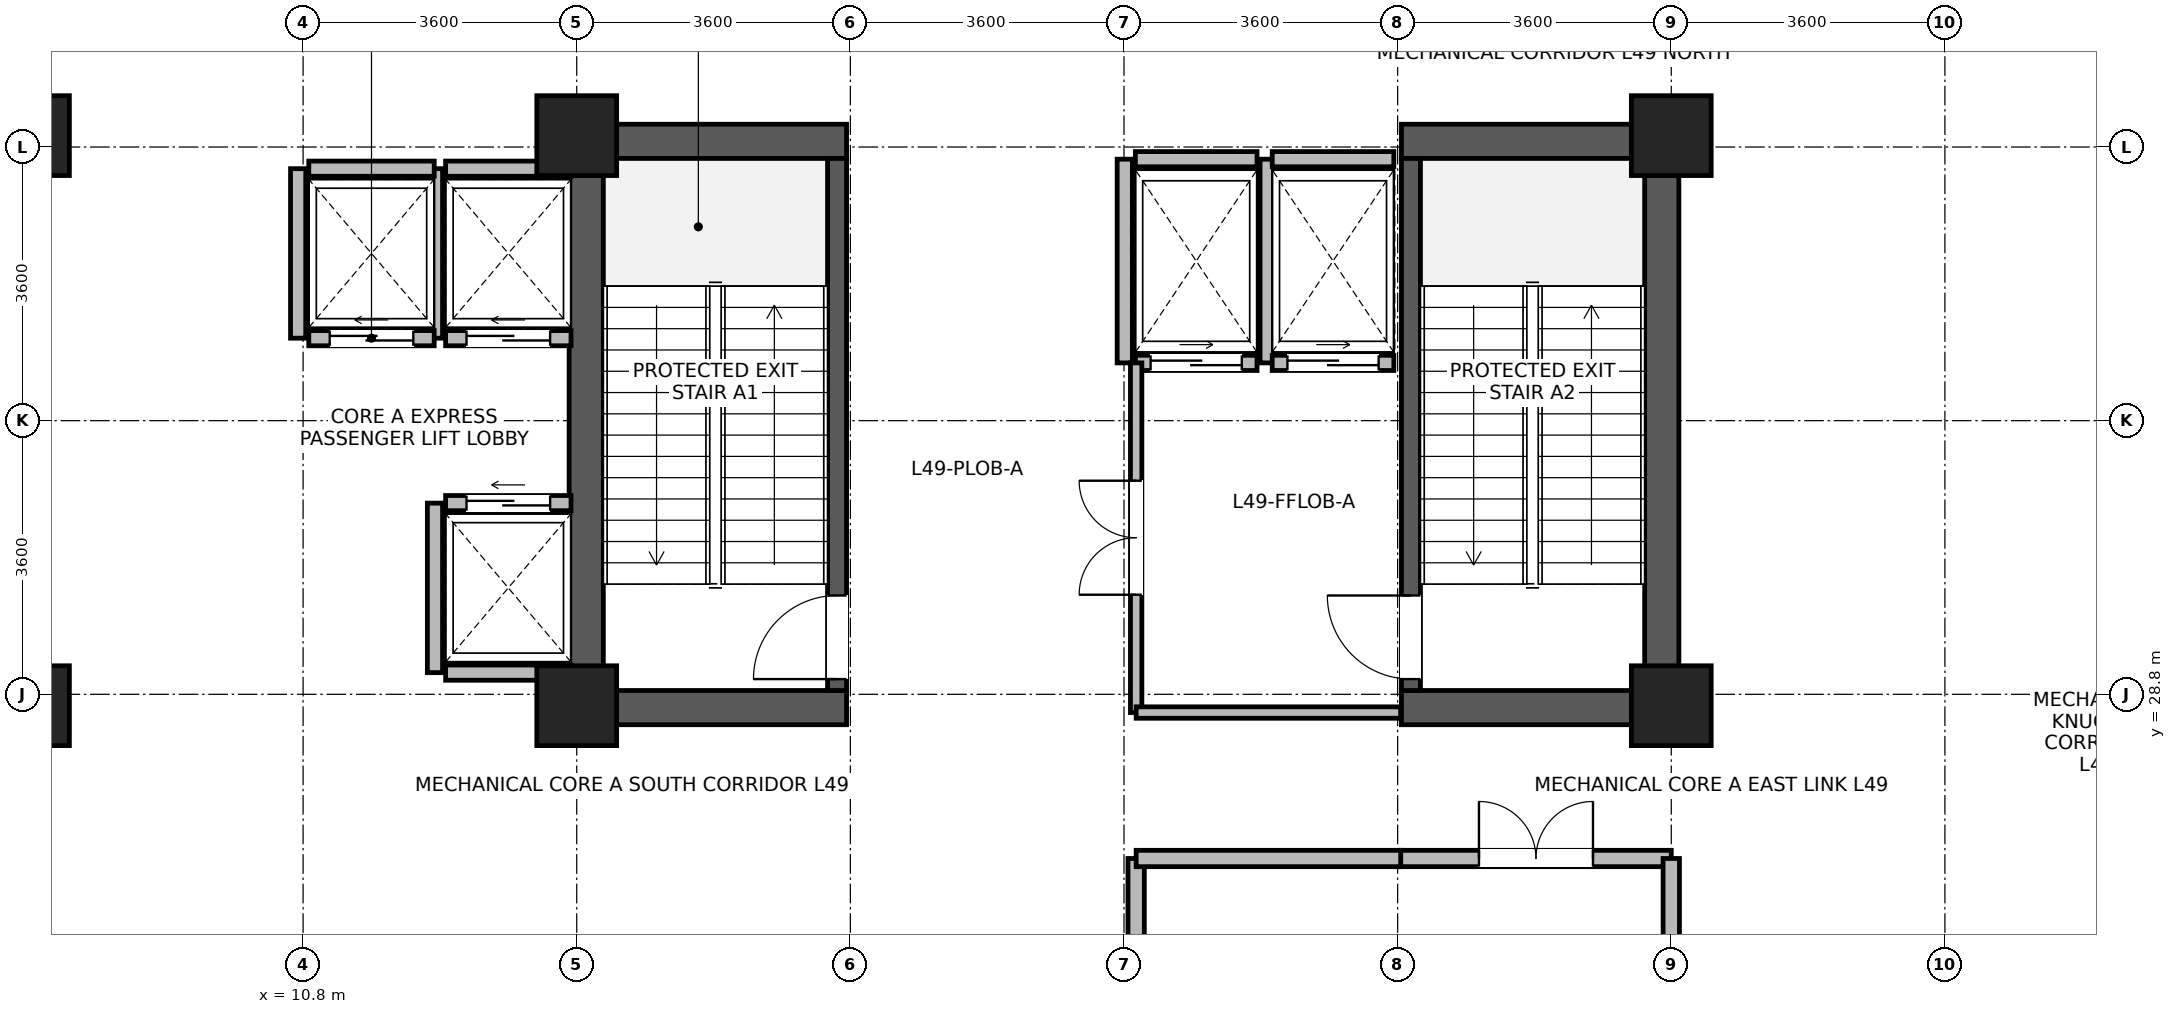
"""IFC4 building model, lengths in metres.
Left out: names, types, materials, properties, quantities, classifications, styles, units other than length and angle.
Written with IfcOpenShell. Run it as: python <this file> out.ifc"""

import sys

from ifc_helpers import new_model, si_unit, direction, frame, frame_2d, origin, origin_2d, place, context, subcontext, project, spatial, rectangle, extrude, source, transform, mapped, element, fill, save


model = new_model("IFC4")
c1 = context("Model", 3, precision=1e-05, world=origin(), true_north=direction((0.0, 1.0)))
c2 = subcontext(c1, "Body", "Model", "MODEL_VIEW")
j1 = project(units=[si_unit("LENGTHUNIT", "METRE"), si_unit("PLANEANGLEUNIT", "RADIAN")], contexts=[c1])
p1 = place(None, origin())
s1 = spatial("IfcSite", under=j1, at=p1, CompositionType="ELEMENT")
p2 = place(p1, origin())
s2 = spatial("IfcBuilding", under=s1, at=p2, CompositionType="ELEMENT")
p3 = place(p2, frame((0.0, 0.0, 192.0)))
s3 = spatial("IfcBuildingStorey", under=s2, at=p3, CompositionType="ELEMENT", Elevation=192.0)
for number, where, z_axis, x_axis in (
    (1, (14.525, 28.4, 0.0), (0.0, 0.0, 1.0), (0.0, 1.0, 0.0)),
    (2, (28.675, 28.4, 0.0), (0.0, 0.0, 1.0), (0.0, 1.0, 0.0)),
):
    element("IfcWall", number, at=place(p3, frame(where, z_axis=z_axis, x_axis=x_axis)), inside=s3, PredefinedType="SHEAR", context=c2, shape_type="SweptSolid", body=[
        extrude(rectangle(XDim=7.9, YDim=0.45, at=frame_2d((3.95, 0.0))), origin(), (0.0, 0.0, 1.0), 4.78),
    ])
for number, where, z_axis, x_axis in (
    (3, (14.75, 28.625, 0.0), (0.0, 0.0, 1.0), (1.0, 0.0, 0.0)),
    (4, (25.25, 28.625, 0.0), (0.0, 0.0, 1.0), (1.0, 0.0, 0.0)),
    (5, (14.75, 36.075, 0.0), (0.0, 0.0, 1.0), (1.0, 0.0, 0.0)),
    (6, (25.25, 36.075, 0.0), (0.0, 0.0, 1.0), (1.0, 0.0, 0.0)),
):
    element("IfcWall", number, at=place(p3, frame(where, z_axis=z_axis, x_axis=x_axis)), inside=s3, PredefinedType="SHEAR", context=c2, shape_type="SweptSolid", body=[
        extrude(rectangle(XDim=3.2, YDim=0.45, at=frame_2d((1.6, 0.0))), origin(), (0.0, 0.0, 1.0), 4.78),
    ])
p4 = place(p3, frame((17.825, 28.85, 0.0), z_axis=(0.0, 0.0, 1.0), x_axis=(0.0, 1.0, 0.0)))
e7 = element("IfcWall", 7, at=p4, inside=s3, PredefinedType="SHEAR", context=c2, shape_type="SweptSolid", body=[
    extrude(rectangle(XDim=7.0, YDim=0.25, at=frame_2d((3.5, 0.0))), origin(), (0.0, 0.0, 1.0), 4.78),
])
p5 = place(p4, frame((0.15, 0.0, 0.0)))
e8 = element("IfcOpeningElement", 8, at=p5, cuts=e7, PredefinedType="OPENING", context=c2, shape_type="SweptSolid", body=[
    extrude(rectangle(XDim=1.1, YDim=2.08, at=frame_2d((0.55, 1.04))), frame((0.0, 0.135, 0.0), z_axis=(0.0, -1.0, 0.0), x_axis=(1.0, 0.0, 0.0)), (0.0, 0.0, 1.0), 0.27),
])
p6 = place(p3, frame((25.375, 28.85, 0.0), z_axis=(0.0, 0.0, 1.0), x_axis=(0.0, 1.0, 0.0)))
e9 = element("IfcWall", 9, at=p6, inside=s3, PredefinedType="SHEAR", context=c2, shape_type="SweptSolid", body=[
    extrude(rectangle(XDim=7.0, YDim=0.25, at=frame_2d((3.5, 0.0))), origin(), (0.0, 0.0, 1.0), 4.78),
])
p7 = place(p6, frame((0.15, 0.0, 0.0)))
e10 = element("IfcOpeningElement", 10, at=p7, cuts=e9, PredefinedType="OPENING", context=c2, shape_type="SweptSolid", body=[
    extrude(rectangle(XDim=1.1, YDim=2.08, at=frame_2d((0.55, 1.04))), frame((0.0, 0.135, 0.0), z_axis=(0.0, -1.0, 0.0), x_axis=(1.0, 0.0, 0.0)), (0.0, 0.0, 1.0), 0.27),
])
m1 = source(origin(), c2, "Body", "SweptSolid", [
    extrude(rectangle(XDim=1.05, YDim=1.05, at=origin_2d()), origin(), (0.0, 0.0, 1.0), 5.2),
])
for number, where, z_axis, x_axis in (
    (11, (7.2, 28.65, 0.0), (0.0, 0.0, 1.0), (1.0, 0.0, 0.0)),
    (12, (7.2, 36.15, 0.0), (0.0, 0.0, 1.0), (1.0, 0.0, 0.0)),
    (13, (14.4, 28.65, 0.0), (0.0, 0.0, 1.0), (1.0, 0.0, 0.0)),
    (14, (14.4, 36.15, 0.0), (0.0, 0.0, 1.0), (1.0, 0.0, 0.0)),
    (15, (28.8, 28.65, 0.0), (0.0, 0.0, 1.0), (1.0, 0.0, 0.0)),
    (16, (28.8, 36.15, 0.0), (0.0, 0.0, 1.0), (1.0, 0.0, 0.0)),
):
    element("IfcColumn", number, at=place(p3, frame(where, z_axis=z_axis, x_axis=x_axis)), inside=s3, PredefinedType="COLUMN", context=c2, shape_type="MappedRepresentation", body=[
        mapped(m1, transform((0.0, 0.0, 0.0), x_axis=(1.0, 0.0, 0.0), y_axis=(0.0, 1.0, 0.0), z_axis=(0.0, 0.0, 1.0), scale=1.0)),
    ])
p8 = place(p3, frame((12.675, 33.485, 0.0), z_axis=(0.0, 0.0, 1.0), x_axis=(1.0, 0.0, 0.0)))
e17 = element("IfcWall", 17, at=p8, inside=s3, PredefinedType="PARTITIONING", context=c2, shape_type="SweptSolid", body=[
    extrude(rectangle(XDim=1.65, YDim=0.2, at=frame_2d((0.825, 0.0))), origin(), (0.0, 0.0, 1.0), 4.76),
])
p9 = place(p8, frame((0.275, 0.0, 0.0)))
e18 = element("IfcOpeningElement", 18, at=p9, cuts=e17, PredefinedType="OPENING", context=c2, shape_type="SweptSolid", body=[
    extrude(rectangle(XDim=1.1, YDim=2.12, at=frame_2d((0.55, 1.06))), frame((0.0, 0.11, 0.0), z_axis=(0.0, -1.0, 0.0), x_axis=(1.0, 0.0, 0.0)), (0.0, 0.0, 1.0), 0.22),
])
p10 = place(p3, frame((12.675, 35.715, 0.0), z_axis=(0.0, 0.0, 1.0), x_axis=(1.0, 0.0, 0.0)))
e19 = element("IfcWall", 19, at=p10, inside=s3, PredefinedType="PARTITIONING", context=c2, shape_type="SweptSolid", body=[
    extrude(rectangle(XDim=1.65, YDim=0.2, at=frame_2d((0.825, 0.0))), origin(), (0.0, 0.0, 1.0), 4.76),
])
p11 = place(p3, frame((12.535, 33.485, 0.0), z_axis=(0.0, 0.0, 1.0), x_axis=(0.0, 1.0, 0.0)))
e20 = element("IfcWall", 20, at=p11, inside=s3, PredefinedType="PARTITIONING", context=c2, shape_type="SweptSolid", body=[
    extrude(rectangle(XDim=2.23, YDim=0.2, at=frame_2d((1.115, 0.0))), origin(), (0.0, 0.0, 1.0), 4.76),
])
p12 = place(p3, frame((12.675, 29.085, 0.0), z_axis=(0.0, 0.0, 1.0), x_axis=(1.0, 0.0, 0.0)))
e21 = element("IfcWall", 21, at=p12, inside=s3, PredefinedType="PARTITIONING", context=c2, shape_type="SweptSolid", body=[
    extrude(rectangle(XDim=1.65, YDim=0.2, at=frame_2d((0.825, 0.0))), origin(), (0.0, 0.0, 1.0), 4.76),
])
p13 = place(p3, frame((12.675, 31.315, 0.0), z_axis=(0.0, 0.0, 1.0), x_axis=(1.0, 0.0, 0.0)))
e22 = element("IfcWall", 22, at=p13, inside=s3, PredefinedType="PARTITIONING", context=c2, shape_type="SweptSolid", body=[
    extrude(rectangle(XDim=1.65, YDim=0.2, at=frame_2d((0.825, 0.0))), origin(), (0.0, 0.0, 1.0), 4.76),
])
p14 = place(p13, frame((0.275, 0.0, 0.0)))
e23 = element("IfcOpeningElement", 23, at=p14, cuts=e22, PredefinedType="OPENING", context=c2, shape_type="SweptSolid", body=[
    extrude(rectangle(XDim=1.1, YDim=2.12, at=frame_2d((0.55, 1.06))), frame((0.0, 0.11, 0.0), z_axis=(0.0, -1.0, 0.0), x_axis=(1.0, 0.0, 0.0)), (0.0, 0.0, 1.0), 0.22),
])
p15 = place(p3, frame((12.535, 29.085, 0.0), z_axis=(0.0, 0.0, 1.0), x_axis=(0.0, 1.0, 0.0)))
e24 = element("IfcWall", 24, at=p15, inside=s3, PredefinedType="PARTITIONING", context=c2, shape_type="SweptSolid", body=[
    extrude(rectangle(XDim=2.23, YDim=0.2, at=frame_2d((1.115, 0.0))), origin(), (0.0, 0.0, 1.0), 4.76),
])
p16 = place(p3, frame((10.875, 33.485, 0.0), z_axis=(0.0, 0.0, 1.0), x_axis=(1.0, 0.0, 0.0)))
e25 = element("IfcWall", 25, at=p16, inside=s3, PredefinedType="PARTITIONING", context=c2, shape_type="SweptSolid", body=[
    extrude(rectangle(XDim=1.65, YDim=0.2, at=frame_2d((0.825, 0.0))), origin(), (0.0, 0.0, 1.0), 4.76),
])
p17 = place(p16, frame((0.275, 0.0, 0.0)))
e26 = element("IfcOpeningElement", 26, at=p17, cuts=e25, PredefinedType="OPENING", context=c2, shape_type="SweptSolid", body=[
    extrude(rectangle(XDim=1.1, YDim=2.12, at=frame_2d((0.55, 1.06))), frame((0.0, 0.11, 0.0), z_axis=(0.0, -1.0, 0.0), x_axis=(1.0, 0.0, 0.0)), (0.0, 0.0, 1.0), 0.22),
])
p18 = place(p3, frame((10.875, 35.715, 0.0), z_axis=(0.0, 0.0, 1.0), x_axis=(1.0, 0.0, 0.0)))
e27 = element("IfcWall", 27, at=p18, inside=s3, PredefinedType="PARTITIONING", context=c2, shape_type="SweptSolid", body=[
    extrude(rectangle(XDim=1.65, YDim=0.2, at=frame_2d((0.825, 0.0))), origin(), (0.0, 0.0, 1.0), 4.76),
])
p19 = place(p3, frame((10.735, 33.485, 0.0), z_axis=(0.0, 0.0, 1.0), x_axis=(0.0, 1.0, 0.0)))
e28 = element("IfcWall", 28, at=p19, inside=s3, PredefinedType="PARTITIONING", context=c2, shape_type="SweptSolid", body=[
    extrude(rectangle(XDim=2.23, YDim=0.2, at=frame_2d((1.115, 0.0))), origin(), (0.0, 0.0, 1.0), 4.76),
])
p20 = place(p3, frame((21.75, 33.16, 0.0), z_axis=(0.0, 0.0, 1.0), x_axis=(1.0, 0.0, 0.0)))
e29 = element("IfcWall", 29, at=p20, inside=s3, PredefinedType="PARTITIONING", context=c2, shape_type="SweptSolid", body=[
    extrude(rectangle(XDim=1.6, YDim=0.2, at=frame_2d((0.8, 0.0))), origin(), (0.0, 0.0, 1.0), 4.76),
])
p21 = place(p20, frame((0.2, 0.0, 0.0)))
e30 = element("IfcOpeningElement", 30, at=p21, cuts=e29, PredefinedType="OPENING", context=c2, shape_type="SweptSolid", body=[
    extrude(rectangle(XDim=1.2, YDim=2.12, at=frame_2d((0.6, 1.06))), frame((0.0, 0.11, 0.0), z_axis=(0.0, -1.0, 0.0), x_axis=(1.0, 0.0, 0.0)), (0.0, 0.0, 1.0), 0.22),
])
p22 = place(p3, frame((21.75, 35.84, 0.0), z_axis=(0.0, 0.0, 1.0), x_axis=(1.0, 0.0, 0.0)))
e31 = element("IfcWall", 31, at=p22, inside=s3, PredefinedType="PARTITIONING", context=c2, shape_type="SweptSolid", body=[
    extrude(rectangle(XDim=1.6, YDim=0.2, at=frame_2d((0.8, 0.0))), origin(), (0.0, 0.0, 1.0), 3.76),
])
for number, where, z_axis, x_axis in (
    (32, (21.61, 33.16, 0.0), (0.0, 0.0, 1.0), (0.0, 1.0, 0.0)),
    (33, (23.49, 33.16, 0.0), (0.0, 0.0, 1.0), (0.0, 1.0, 0.0)),
):
    element("IfcWall", number, at=place(p3, frame(where, z_axis=z_axis, x_axis=x_axis)), inside=s3, PredefinedType="PARTITIONING", context=c2, shape_type="SweptSolid", body=[
        extrude(rectangle(XDim=2.68, YDim=0.2, at=frame_2d((1.34, 0.0))), origin(), (0.0, 0.0, 1.0), 4.76),
    ])
p23 = place(p3, frame((23.55, 33.16, 0.0), z_axis=(0.0, 0.0, 1.0), x_axis=(1.0, 0.0, 0.0)))
e34 = element("IfcWall", 34, at=p23, inside=s3, PredefinedType="PARTITIONING", context=c2, shape_type="SweptSolid", body=[
    extrude(rectangle(XDim=1.6, YDim=0.2, at=frame_2d((0.8, 0.0))), origin(), (0.0, 0.0, 1.0), 4.76),
])
p24 = place(p23, frame((0.2, 0.0, 0.0)))
e35 = element("IfcOpeningElement", 35, at=p24, cuts=e34, PredefinedType="OPENING", context=c2, shape_type="SweptSolid", body=[
    extrude(rectangle(XDim=1.2, YDim=2.12, at=frame_2d((0.6, 1.06))), frame((0.0, 0.11, 0.0), z_axis=(0.0, -1.0, 0.0), x_axis=(1.0, 0.0, 0.0)), (0.0, 0.0, 1.0), 0.22),
])
p25 = place(p3, frame((23.55, 35.84, 0.0), z_axis=(0.0, 0.0, 1.0), x_axis=(1.0, 0.0, 0.0)))
e36 = element("IfcWall", 36, at=p25, inside=s3, PredefinedType="PARTITIONING", context=c2, shape_type="SweptSolid", body=[
    extrude(rectangle(XDim=1.6, YDim=0.2, at=frame_2d((0.8, 0.0))), origin(), (0.0, 0.0, 1.0), 3.76),
])
p26 = place(p3, frame((25.24, 26.64, 0.0), z_axis=(0.0, 0.0, 1.0), x_axis=(1.0, 0.0, 0.0)))
e37 = element("IfcWall", 37, at=p26, inside=s3, PredefinedType="PARTITIONING", context=c2, shape_type="SweptSolid", body=[
    extrude(rectangle(XDim=3.56, YDim=0.215, at=frame_2d((1.78, 0.0))), origin(), (0.0, 0.0, 1.0), 4.76),
])
p27 = place(p26, frame((1.03, 0.0, 0.0)))
e38 = element("IfcOpeningElement", 38, at=p27, cuts=e37, PredefinedType="OPENING", context=c2, shape_type="SweptSolid", body=[
    extrude(rectangle(XDim=1.5, YDim=2.1, at=frame_2d((0.75, 1.05))), frame((0.0, 0.118, 0.0), z_axis=(0.0, -1.0, 0.0), x_axis=(1.0, 0.0, 0.0)), (0.0, 0.0, 1.0), 0.235),
])
p28 = place(p3, frame((21.76, 22.125, 0.0), z_axis=(0.0, 0.0, 1.0), x_axis=(0.0, 1.0, 0.0)))
e39 = element("IfcWall", 39, at=p28, inside=s3, PredefinedType="PARTITIONING", context=c2, shape_type="SweptSolid", body=[
    extrude(rectangle(XDim=4.515, YDim=0.215, at=frame_2d((2.257, 0.0))), origin(), (0.0, 0.0, 1.0), 3.16),
])
p29 = place(p3, frame((28.8, 22.125, 0.0), z_axis=(0.0, 0.0, 1.0), x_axis=(0.0, 1.0, 0.0)))
e40 = element("IfcWall", 40, at=p29, inside=s3, PredefinedType="PARTITIONING", context=c2, shape_type="SweptSolid", body=[
    extrude(rectangle(XDim=4.515, YDim=0.215, at=frame_2d((2.257, 0.0))), origin(), (0.0, 0.0, 1.0), 2.96),
])
p30 = place(p3, frame((21.76, 28.56, 0.0), z_axis=(0.0, 0.0, 1.0), x_axis=(0.0, 1.0, 0.0)))
e41 = element("IfcWall", 41, at=p30, inside=s3, PredefinedType="PARTITIONING", context=c2, shape_type="SweptSolid", body=[
    extrude(rectangle(XDim=4.6, YDim=0.15, at=frame_2d((2.3, 0.0))), origin(), (0.0, 0.0, 1.0), 3.16),
])
p31 = place(p30, frame((1.55, 0.0, 0.0)))
e42 = element("IfcOpeningElement", 42, at=p31, cuts=e41, PredefinedType="OPENING", context=c2, shape_type="SweptSolid", body=[
    extrude(rectangle(XDim=1.5, YDim=2.1, at=frame_2d((0.75, 1.05))), frame((0.0, 0.085, 0.0), z_axis=(0.0, -1.0, 0.0), x_axis=(1.0, 0.0, 0.0)), (0.0, 0.0, 1.0), 0.17),
])
p32 = place(p3, frame((21.76, 26.64, 0.0), z_axis=(0.0, 0.0, 1.0), x_axis=(1.0, 0.0, 0.0)))
e43 = element("IfcWall", 43, at=p32, inside=s3, PredefinedType="PARTITIONING", context=c2, shape_type="SweptSolid", body=[
    extrude(rectangle(XDim=3.48, YDim=0.215, at=frame_2d((1.74, 0.0))), origin(), (0.0, 0.0, 1.0), 4.76),
])
p33 = place(p3, frame((21.76, 28.56, 0.0), z_axis=(0.0, 0.0, 1.0), x_axis=(1.0, 0.0, 0.0)))
e44 = element("IfcWall", 44, at=p33, inside=s3, PredefinedType="PARTITIONING", context=c2, shape_type="SweptSolid", body=[
    extrude(rectangle(XDim=3.48, YDim=0.15, at=frame_2d((1.74, 0.0))), origin(), (0.0, 0.0, 1.0), 3.76),
])
p34 = place(p5, origin())
e45 = element("IfcDoor", 45, at=p34, inside=s3, OperationType="SINGLE_SWING_LEFT", PredefinedType="DOOR", context=c2, shape_type="SweptSolid", body=[
    extrude(rectangle(XDim=1.1, YDim=2.08, at=frame_2d((0.55, 1.04))), frame((0.0, 0.025, 0.0), z_axis=(0.0, -1.0, 0.0), x_axis=(1.0, 0.0, 0.0)), (0.0, 0.0, 1.0), 0.05),
])
fill(e8, e45)
p35 = place(p7, origin())
e46 = element("IfcDoor", 46, at=p35, inside=s3, OperationType="SINGLE_SWING_RIGHT", PredefinedType="DOOR", context=c2, shape_type="SweptSolid", body=[
    extrude(rectangle(XDim=1.1, YDim=2.08, at=frame_2d((0.55, 1.04))), frame((0.0, 0.025, 0.0), z_axis=(0.0, -1.0, 0.0), x_axis=(1.0, 0.0, 0.0)), (0.0, 0.0, 1.0), 0.05),
])
fill(e10, e46)
p36 = place(p9, origin())
e47 = element("IfcDoor", 47, at=p36, inside=s3, OperationType="SLIDING_TO_LEFT", PredefinedType="DOOR", context=c2, shape_type="SweptSolid", body=[
    extrude(rectangle(XDim=1.1, YDim=2.12, at=frame_2d((0.55, 1.06))), frame((0.0, 0.025, 0.0), z_axis=(0.0, -1.0, 0.0), x_axis=(1.0, 0.0, 0.0)), (0.0, 0.0, 1.0), 0.05),
])
fill(e18, e47)
p37 = place(p14, origin())
e48 = element("IfcDoor", 48, at=p37, inside=s3, OperationType="SLIDING_TO_LEFT", PredefinedType="DOOR", context=c2, shape_type="SweptSolid", body=[
    extrude(rectangle(XDim=1.1, YDim=2.12, at=frame_2d((0.55, 1.06))), frame((0.0, 0.025, 0.0), z_axis=(0.0, -1.0, 0.0), x_axis=(1.0, 0.0, 0.0)), (0.0, 0.0, 1.0), 0.05),
])
fill(e23, e48)
p38 = place(p17, origin())
e49 = element("IfcDoor", 49, at=p38, inside=s3, OperationType="SLIDING_TO_LEFT", PredefinedType="DOOR", context=c2, shape_type="SweptSolid", body=[
    extrude(rectangle(XDim=1.1, YDim=2.12, at=frame_2d((0.55, 1.06))), frame((0.0, 0.025, 0.0), z_axis=(0.0, -1.0, 0.0), x_axis=(1.0, 0.0, 0.0)), (0.0, 0.0, 1.0), 0.05),
])
fill(e26, e49)
p39 = place(p21, origin())
e50 = element("IfcDoor", 50, at=p39, inside=s3, OperationType="SLIDING_TO_RIGHT", PredefinedType="DOOR", context=c2, shape_type="SweptSolid", body=[
    extrude(rectangle(XDim=1.2, YDim=2.12, at=frame_2d((0.6, 1.06))), frame((0.0, 0.025, 0.0), z_axis=(0.0, -1.0, 0.0), x_axis=(1.0, 0.0, 0.0)), (0.0, 0.0, 1.0), 0.05),
])
fill(e30, e50)
p40 = place(p24, origin())
e51 = element("IfcDoor", 51, at=p40, inside=s3, OperationType="SLIDING_TO_RIGHT", PredefinedType="DOOR", context=c2, shape_type="SweptSolid", body=[
    extrude(rectangle(XDim=1.2, YDim=2.12, at=frame_2d((0.6, 1.06))), frame((0.0, 0.025, 0.0), z_axis=(0.0, -1.0, 0.0), x_axis=(1.0, 0.0, 0.0)), (0.0, 0.0, 1.0), 0.05),
])
fill(e35, e51)
p41 = place(p27, origin())
e52 = element("IfcDoor", 52, at=p41, inside=s3, OperationType="DOUBLE_DOOR_SINGLE_SWING", PredefinedType="DOOR", context=c2, shape_type="SweptSolid", body=[
    extrude(rectangle(XDim=1.5, YDim=2.1, at=frame_2d((0.75, 1.05))), frame((0.0, 0.025, 0.0), z_axis=(0.0, -1.0, 0.0), x_axis=(1.0, 0.0, 0.0)), (0.0, 0.0, 1.0), 0.05),
])
fill(e38, e52)
p42 = place(p31, origin())
e53 = element("IfcDoor", 53, at=p42, inside=s3, OperationType="DOUBLE_DOOR_SINGLE_SWING", PredefinedType="DOOR", context=c2, shape_type="SweptSolid", body=[
    extrude(rectangle(XDim=1.5, YDim=2.1, at=frame_2d((0.75, 1.05))), frame((0.0, 0.025, 0.0), z_axis=(0.0, -1.0, 0.0), x_axis=(1.0, 0.0, 0.0)), (0.0, 0.0, 1.0), 0.05),
])
fill(e42, e53)
save(model, sys.argv[1])
